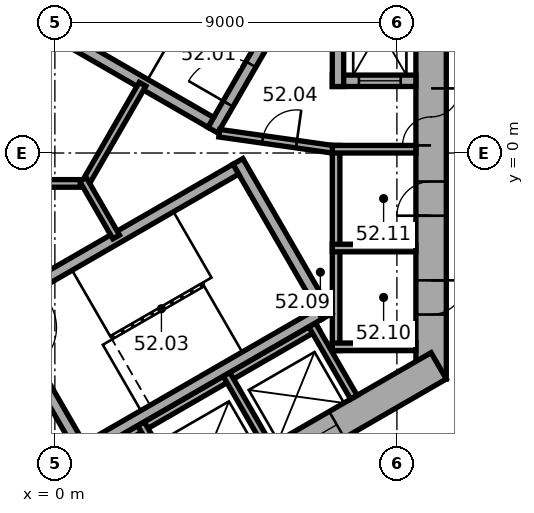
"""IFC4 building model, lengths in metres.
Left out: names, types, materials, properties, quantities, classifications, styles, units other than length and angle.
Written with IfcOpenShell. Run it as: python <this file> out.ifc"""

import sys

from ifc_helpers import new_model, si_unit, direction, frame, frame_2d, origin, place, context, subcontext, project, spatial, rectangle, extrude, element, fill, save


model = new_model("IFC4")
c1 = context("Model", 3, precision=1e-05, world=origin(), true_north=direction((0.0, 1.0)))
c2 = subcontext(c1, "Body", "Model", "MODEL_VIEW")
j1 = project(units=[si_unit("LENGTHUNIT", "METRE"), si_unit("PLANEANGLEUNIT", "RADIAN")], contexts=[c1])
p1 = place(None, origin())
s1 = spatial("IfcSite", under=j1, at=p1, CompositionType="ELEMENT")
p2 = place(p1, origin())
s2 = spatial("IfcBuilding", under=s1, at=p2, CompositionType="ELEMENT")
p3 = place(p2, frame((0.0, 0.0, 210.6)))
s3 = spatial("IfcBuildingStorey", under=s2, at=p3, CompositionType="ELEMENT", Elevation=210.6)
p4 = place(p3, frame((9.9, -5.947, 0.0), z_axis=(0.0, 0.0, 1.0), x_axis=(0.0, 1.0, 0.0)))
e1 = element("IfcWall", 1, at=p4, inside=s3, PredefinedType="SHEAR", context=c2, shape_type="SweptSolid", body=[
    extrude(rectangle(XDim=11.894, YDim=0.8, at=frame_2d((5.947, 0.0))), origin(), (0.0, 0.0, 1.0), 3.7),
])
p5 = place(p4, frame((6.147, 0.0, 0.0)))
e2 = element("IfcOpeningElement", 2, at=p5, cuts=e1, PredefinedType="OPENING", context=c2, shape_type="SweptSolid", body=[
    extrude(rectangle(XDim=1.5, YDim=2.1, at=frame_2d((0.75, 1.05))), frame((0.0, 0.41, 0.0), z_axis=(0.0, -1.0, 0.0), x_axis=(1.0, 0.0, 0.0)), (0.0, 0.0, 1.0), 0.82),
])
p6 = place(p4, frame((1.697, 0.0, 0.0)))
e3 = element("IfcOpeningElement", 3, at=p6, cuts=e1, PredefinedType="OPENING", context=c2, shape_type="SweptSolid", body=[
    extrude(rectangle(XDim=0.9, YDim=2.1, at=frame_2d((0.45, 1.05))), frame((0.0, 0.41, 0.0), z_axis=(0.0, -1.0, 0.0), x_axis=(1.0, 0.0, 0.0)), (0.0, 0.0, 1.0), 0.82),
])
p7 = place(p4, frame((4.297, 0.0, 0.0)))
e4 = element("IfcOpeningElement", 4, at=p7, cuts=e1, PredefinedType="OPENING", context=c2, shape_type="SweptSolid", body=[
    extrude(rectangle(XDim=0.9, YDim=2.1, at=frame_2d((0.45, 1.05))), frame((0.0, 0.41, 0.0), z_axis=(0.0, -1.0, 0.0), x_axis=(1.0, 0.0, 0.0)), (0.0, 0.0, 1.0), 0.82),
])
p8 = place(p3, frame((-10.1, -5.6, 0.0), z_axis=(0.0, 0.0, 1.0), x_axis=(0.866023897231, -0.500002609418, 0.0)))
e5 = element("IfcWall", 5, at=p8, inside=s3, PredefinedType="SHEAR", context=c2, shape_type="SweptSolid", body=[
    extrude(rectangle(XDim=11.894, YDim=0.8, at=frame_2d((5.947, 0.0))), origin(), (0.0, 0.0, 1.0), 3.7),
])
p9 = place(p8, frame((6.147, 0.0, 0.0)))
e6 = element("IfcOpeningElement", 6, at=p9, cuts=e5, PredefinedType="OPENING", context=c2, shape_type="SweptSolid", body=[
    extrude(rectangle(XDim=1.5, YDim=2.1, at=frame_2d((0.75, 1.05))), frame((0.0, 0.41, 0.0), z_axis=(0.0, -1.0, 0.0), x_axis=(1.0, 0.0, 0.0)), (0.0, 0.0, 1.0), 0.82),
])
p10 = place(p8, frame((1.597, 0.0, 0.0)))
e7 = element("IfcOpeningElement", 7, at=p10, cuts=e5, PredefinedType="OPENING", context=c2, shape_type="SweptSolid", body=[
    extrude(rectangle(XDim=1.1, YDim=2.1, at=frame_2d((0.55, 1.05))), frame((0.0, 0.41, 0.0), z_axis=(0.0, -1.0, 0.0), x_axis=(1.0, 0.0, 0.0)), (0.0, 0.0, 1.0), 0.82),
])
p11 = place(p8, frame((4.197, 0.0, 0.0)))
e8 = element("IfcOpeningElement", 8, at=p11, cuts=e5, PredefinedType="OPENING", context=c2, shape_type="SweptSolid", body=[
    extrude(rectangle(XDim=1.1, YDim=2.1, at=frame_2d((0.55, 1.05))), frame((0.0, 0.41, 0.0), z_axis=(0.0, -1.0, 0.0), x_axis=(1.0, 0.0, 0.0)), (0.0, 0.0, 1.0), 0.82),
])
p12 = place(p3, frame((-0.2, -11.547, 0.0), z_axis=(0.0, 0.0, 1.0), x_axis=(0.866023897231, 0.500002609418, 0.0)))
e9 = element("IfcWall", 9, at=p12, inside=s3, PredefinedType="SHEAR", context=c2, shape_type="SweptSolid", body=[
    extrude(rectangle(XDim=11.894, YDim=0.8, at=frame_2d((5.947, 0.0))), origin(), (0.0, 0.0, 1.0), 3.7),
])
p13 = place(p12, frame((2.497, 0.0, 0.0)))
e10 = element("IfcOpeningElement", 10, at=p13, cuts=e9, PredefinedType="OPENING", context=c2, shape_type="SweptSolid", body=[
    extrude(rectangle(XDim=1.1, YDim=2.1, at=frame_2d((0.55, 1.05))), frame((0.0, 0.41, 0.0), z_axis=(0.0, -1.0, 0.0), x_axis=(1.0, 0.0, 0.0)), (0.0, 0.0, 1.0), 0.82),
])
p14 = place(p12, frame((5.097, 0.0, 0.0)))
e11 = element("IfcOpeningElement", 11, at=p14, cuts=e9, PredefinedType="OPENING", context=c2, shape_type="SweptSolid", body=[
    extrude(rectangle(XDim=1.1, YDim=2.1, at=frame_2d((0.55, 1.05))), frame((0.0, 0.41, 0.0), z_axis=(0.0, -1.0, 0.0), x_axis=(1.0, 0.0, 0.0)), (0.0, 0.0, 1.0), 0.82),
])
p15 = place(p12, frame((7.697, 0.0, 0.0)))
e12 = element("IfcOpeningElement", 12, at=p15, cuts=e9, PredefinedType="OPENING", context=c2, shape_type="SweptSolid", body=[
    extrude(rectangle(XDim=1.1, YDim=2.1, at=frame_2d((0.55, 1.05))), frame((0.0, 0.41, 0.0), z_axis=(0.0, -1.0, 0.0), x_axis=(1.0, 0.0, 0.0)), (0.0, 0.0, 1.0), 0.82),
])
p16 = place(p3, frame((7.4, -5.2, 0.0), z_axis=(0.0, 0.0, 1.0), x_axis=(0.0, 1.0, 0.0)))
e13 = element("IfcWall", 13, at=p16, inside=s3, PredefinedType="PARTITIONING", context=c2, shape_type="SweptSolid", body=[
    extrude(rectangle(XDim=5.4, YDim=0.2, at=frame_2d((2.7, 0.0))), origin(), (0.0, 0.0, 1.0), 3.35),
])
for number, where, z_axis, x_axis in (
    (14, (7.3, -5.1, 0.0), (0.0, 0.0, 1.0), (1.0, 0.0, 0.0)),
    (15, (7.3, -2.5, 0.0), (0.0, 0.0, 1.0), (1.0, 0.0, 0.0)),
    (16, (7.3, 0.1, 0.0), (0.0, 0.0, 1.0), (1.0, 0.0, 0.0)),
):
    element("IfcWall", number, at=place(p3, frame(where, z_axis=z_axis, x_axis=x_axis)), inside=s3, PredefinedType="PARTITIONING", context=c2, shape_type="SweptSolid", body=[
        extrude(rectangle(XDim=2.2, YDim=0.2, at=frame_2d((1.1, 0.0))), origin(), (0.0, 0.0, 1.0), 3.35),
    ])
p17 = place(p3, frame((-0.024, -8.559, 0.0), z_axis=(0.0, 0.0, 1.0), x_axis=(0.866026010844, 0.49999894854, 0.0)))
e17 = element("IfcWall", 17, at=p17, inside=s3, PredefinedType="PARTITIONING", context=c2, shape_type="SweptSolid", body=[
    extrude(rectangle(XDim=8.0, YDim=0.2, at=frame_2d((4.0, 0.0))), origin(), (0.0, 0.0, 1.0), 3.35),
])
for number, where, z_axis, x_axis in (
    (18, (2.264, -7.122, 0.0), (0.0, 0.0, 1.0), (0.5, -0.866, 0.0)),
    (19, (4.516, -5.822, 0.0), (0.0, 0.0, 1.0), (0.5, -0.866, 0.0)),
    (20, (6.768, -4.522, 0.0), (0.0, 0.0, 1.0), (0.5, -0.866, 0.0)),
):
    element("IfcWall", number, at=place(p3, frame(where, z_axis=z_axis, x_axis=x_axis)), inside=s3, PredefinedType="PARTITIONING", context=c2, shape_type="SweptSolid", body=[
        extrude(rectangle(XDim=2.2, YDim=0.2, at=frame_2d((1.1, 0.0))), origin(), (0.0, 0.0, 1.0), 3.35),
    ])
p18 = place(p3, frame((4.158, 0.602, 0.0), z_axis=(0.0, 0.0, 1.0), x_axis=(0.499977259774, 0.866038532462, 0.0)))
e21 = element("IfcWall", 21, at=p18, inside=s3, PredefinedType="SHEAR", context=c2, shape_type="SweptSolid", body=[
    extrude(rectangle(XDim=4.7, YDim=0.3, at=frame_2d((2.35, 0.0))), origin(), (0.0, 0.0, 1.0), 3.35),
])
p19 = place(p18, frame((0.8, 0.0, 0.0)))
e22 = element("IfcOpeningElement", 22, at=p19, cuts=e21, PredefinedType="OPENING", context=c2, shape_type="SweptSolid", body=[
    extrude(rectangle(XDim=1.2, YDim=2.1, at=frame_2d((0.6, 1.05))), frame((0.0, 0.16, 0.0), z_axis=(0.0, -1.0, 0.0), x_axis=(1.0, 0.0, 0.0)), (0.0, 0.0, 1.0), 0.32),
])
p20 = place(p3, frame((4.103, 0.807, 0.0), z_axis=(0.0, 0.0, 1.0), x_axis=(-0.866027801685, 0.499995846692, 0.0)))
e23 = element("IfcWall", 23, at=p20, inside=s3, PredefinedType="SHEAR", context=c2, shape_type="SweptSolid", body=[
    extrude(rectangle(XDim=7.06, YDim=0.3, at=frame_2d((3.53, 0.0))), origin(), (0.0, 0.0, 1.0), 3.35),
])
p21 = place(p3, frame((-1.558, -3.902, 0.0), z_axis=(0.0, 0.0, 1.0), x_axis=(0.499977259774, -0.866038532462, 0.0)))
e24 = element("IfcWall", 24, at=p21, inside=s3, PredefinedType="SHEAR", context=c2, shape_type="SweptSolid", body=[
    extrude(rectangle(XDim=4.7, YDim=0.3, at=frame_2d((2.35, 0.0))), origin(), (0.0, 0.0, 1.0), 3.35),
])
p22 = place(p21, frame((0.8, 0.0, 0.0)))
e25 = element("IfcOpeningElement", 25, at=p22, cuts=e24, PredefinedType="OPENING", context=c2, shape_type="SweptSolid", body=[
    extrude(rectangle(XDim=1.2, YDim=2.1, at=frame_2d((0.6, 1.05))), frame((0.0, 0.16, 0.0), z_axis=(0.0, -1.0, 0.0), x_axis=(1.0, 0.0, 0.0)), (0.0, 0.0, 1.0), 0.32),
])
p23 = place(p3, frame((4.816, -0.222, 0.0), z_axis=(0.0, 0.0, 1.0), x_axis=(0.499977259774, -0.866038532462, 0.0)))
e26 = element("IfcWall", 26, at=p23, inside=s3, PredefinedType="SHEAR", context=c2, shape_type="SweptSolid", body=[
    extrude(rectangle(XDim=4.7, YDim=0.3, at=frame_2d((2.35, 0.0))), origin(), (0.0, 0.0, 1.0), 3.35),
])
for number, where, z_axis, x_axis in (
    (27, (-1.353, -3.957, 0.0), (0.0, 0.0, 1.0), (0.866, 0.5, 0.0)),
    (28, (0.847, -7.767, 0.0), (0.0, 0.0, 1.0), (0.866, 0.5, 0.0)),
):
    element("IfcWall", number, at=place(p3, frame(where, z_axis=z_axis, x_axis=x_axis)), inside=s3, PredefinedType="SHEAR", context=c2, shape_type="SweptSolid", body=[
        extrude(rectangle(XDim=7.06, YDim=0.3, at=frame_2d((3.53, 0.0))), origin(), (0.0, 0.0, 1.0), 3.35),
    ])
p24 = place(p3, frame((7.3, 1.9, 0.0), z_axis=(0.0, 0.0, 1.0), x_axis=(1.0, 0.0, 0.0)))
e29 = element("IfcWall", 29, at=p24, inside=s3, PredefinedType="SHEAR", context=c2, shape_type="SweptSolid", body=[
    extrude(rectangle(XDim=2.2, YDim=0.3, at=frame_2d((1.1, 0.0))), origin(), (0.0, 0.0, 1.0), 3.35),
])
p25 = place(p24, frame((0.7, 0.0, 0.0)))
e30 = element("IfcOpeningElement", 30, at=p25, cuts=e29, PredefinedType="OPENING", context=c2, shape_type="SweptSolid", body=[
    extrude(rectangle(XDim=1.1, YDim=2.1, at=frame_2d((0.55, 1.05))), frame((0.0, 0.16, 0.0), z_axis=(0.0, -1.0, 0.0), x_axis=(1.0, 0.0, 0.0)), (0.0, 0.0, 1.0), 0.32),
])
p26 = place(p3, frame((7.45, 1.75, 0.0), z_axis=(0.0, 0.0, 1.0), x_axis=(0.0, 1.0, 0.0)))
e31 = element("IfcWall", 31, at=p26, inside=s3, PredefinedType="SHEAR", context=c2, shape_type="SweptSolid", body=[
    extrude(rectangle(XDim=3.35, YDim=0.3, at=frame_2d((1.675, 0.0))), origin(), (0.0, 0.0, 1.0), 3.35),
])
p27 = place(p3, frame((4.327, 0.521, 0.0), z_axis=(0.0, 0.0, 1.0), x_axis=(0.990124376366, -0.14019172346, 0.0)))
e32 = element("IfcWall", 32, at=p27, inside=s3, PredefinedType="PARTITIONING", context=c2, shape_type="SweptSolid", body=[
    extrude(rectangle(XDim=3.002, YDim=0.2, at=frame_2d((1.501, 0.0))), origin(), (0.0, 0.0, 1.0), 3.35),
])
p28 = place(p27, frame((1.15, 0.0, 0.0)))
e33 = element("IfcOpeningElement", 33, at=p28, cuts=e32, PredefinedType="OPENING", context=c2, shape_type="SweptSolid", body=[
    extrude(rectangle(XDim=0.9, YDim=2.1, at=frame_2d((0.45, 1.05))), frame((0.0, 0.11, 0.0), z_axis=(0.0, -1.0, 0.0), x_axis=(1.0, 0.0, 0.0)), (0.0, 0.0, 1.0), 0.22),
])
p29 = place(p3, frame((0.92, -0.8, 0.0), z_axis=(0.0, 0.0, 1.0), x_axis=(-1.0, 0.0, 0.0)))
e34 = element("IfcWall", 34, at=p29, inside=s3, PredefinedType="PARTITIONING", context=c2, shape_type="SweptSolid", body=[
    extrude(rectangle(XDim=3.64, YDim=0.2, at=frame_2d((1.82, 0.0))), origin(), (0.0, 0.0, 1.0), 3.35),
])
p30 = place(p3, frame((0.74, -0.904, 0.0), z_axis=(0.0, 0.0, 1.0), x_axis=(0.500028278809, 0.866009076391, 0.0)))
e35 = element("IfcWall", 35, at=p30, inside=s3, PredefinedType="PARTITIONING", context=c2, shape_type="SweptSolid", body=[
    extrude(rectangle(XDim=3.133, YDim=0.2, at=frame_2d((1.566, 0.0))), origin(), (0.0, 0.0, 1.0), 3.35),
])
p31 = place(p3, frame((0.74, -0.696, 0.0), z_axis=(0.0, 0.0, 1.0), x_axis=(0.499956301907, -0.86605063142, 0.0)))
e36 = element("IfcWall", 36, at=p31, inside=s3, PredefinedType="PARTITIONING", context=c2, shape_type="SweptSolid", body=[
    extrude(rectangle(XDim=1.747, YDim=0.2, at=frame_2d((0.874, 0.0))), origin(), (0.0, 0.0, 1.0), 3.35),
])
p32 = place(p5, origin())
e37 = element("IfcDoor", 37, at=p32, inside=s3, OperationType="DOUBLE_DOOR_SINGLE_SWING", PredefinedType="DOOR", context=c2, shape_type="SweptSolid", body=[
    extrude(rectangle(XDim=1.5, YDim=2.1, at=frame_2d((0.75, 1.05))), frame((0.0, 0.025, 0.0), z_axis=(0.0, -1.0, 0.0), x_axis=(1.0, 0.0, 0.0)), (0.0, 0.0, 1.0), 0.05),
])
fill(e2, e37)
p33 = place(p19, origin())
e38 = element("IfcDoor", 38, at=p33, inside=s3, OperationType="SINGLE_SWING_RIGHT", PredefinedType="DOOR", context=c2, shape_type="SweptSolid", body=[
    extrude(rectangle(XDim=1.2, YDim=2.1, at=frame_2d((0.6, 1.05))), frame((0.0, 0.025, 0.0), z_axis=(0.0, -1.0, 0.0), x_axis=(1.0, 0.0, 0.0)), (0.0, 0.0, 1.0), 0.05),
])
fill(e22, e38)
p34 = place(p28, origin())
e39 = element("IfcDoor", 39, at=p34, inside=s3, OperationType="SINGLE_SWING_LEFT", PredefinedType="DOOR", context=c2, shape_type="SweptSolid", body=[
    extrude(rectangle(XDim=0.9, YDim=2.1, at=frame_2d((0.45, 1.05))), frame((0.0, 0.025, 0.0), z_axis=(0.0, -1.0, 0.0), x_axis=(1.0, 0.0, 0.0)), (0.0, 0.0, 1.0), 0.05),
])
fill(e33, e39)
p35 = place(p6, origin())
e40 = element("IfcDoor", 40, at=p35, inside=s3, OperationType="SINGLE_SWING_LEFT", PredefinedType="DOOR", context=c2, shape_type="SweptSolid", body=[
    extrude(rectangle(XDim=0.9, YDim=2.1, at=frame_2d((0.45, 1.05))), frame((0.0, 0.025, 0.0), z_axis=(0.0, -1.0, 0.0), x_axis=(1.0, 0.0, 0.0)), (0.0, 0.0, 1.0), 0.05),
])
fill(e3, e40)
p36 = place(p7, origin())
e41 = element("IfcDoor", 41, at=p36, inside=s3, OperationType="SINGLE_SWING_LEFT", PredefinedType="DOOR", context=c2, shape_type="SweptSolid", body=[
    extrude(rectangle(XDim=0.9, YDim=2.1, at=frame_2d((0.45, 1.05))), frame((0.0, 0.025, 0.0), z_axis=(0.0, -1.0, 0.0), x_axis=(1.0, 0.0, 0.0)), (0.0, 0.0, 1.0), 0.05),
])
fill(e4, e41)
p37 = place(p25, origin())
e42 = element("IfcDoor", 42, at=p37, inside=s3, OperationType="DOUBLE_DOOR_SLIDING", PredefinedType="DOOR", context=c2, shape_type="SweptSolid", body=[
    extrude(rectangle(XDim=1.1, YDim=2.1, at=frame_2d((0.55, 1.05))), frame((0.0, 0.025, 0.0), z_axis=(0.0, -1.0, 0.0), x_axis=(1.0, 0.0, 0.0)), (0.0, 0.0, 1.0), 0.05),
])
fill(e30, e42)
p38 = place(p15, origin())
e43 = element("IfcDoor", 43, at=p38, inside=s3, OperationType="DOUBLE_DOOR_SLIDING", PredefinedType="DOOR", context=c2, shape_type="SweptSolid", body=[
    extrude(rectangle(XDim=1.1, YDim=2.1, at=frame_2d((0.55, 1.05))), frame((0.0, 0.025, 0.0), z_axis=(0.0, -1.0, 0.0), x_axis=(1.0, 0.0, 0.0)), (0.0, 0.0, 1.0), 0.05),
])
fill(e12, e43)
save(model, sys.argv[1])
